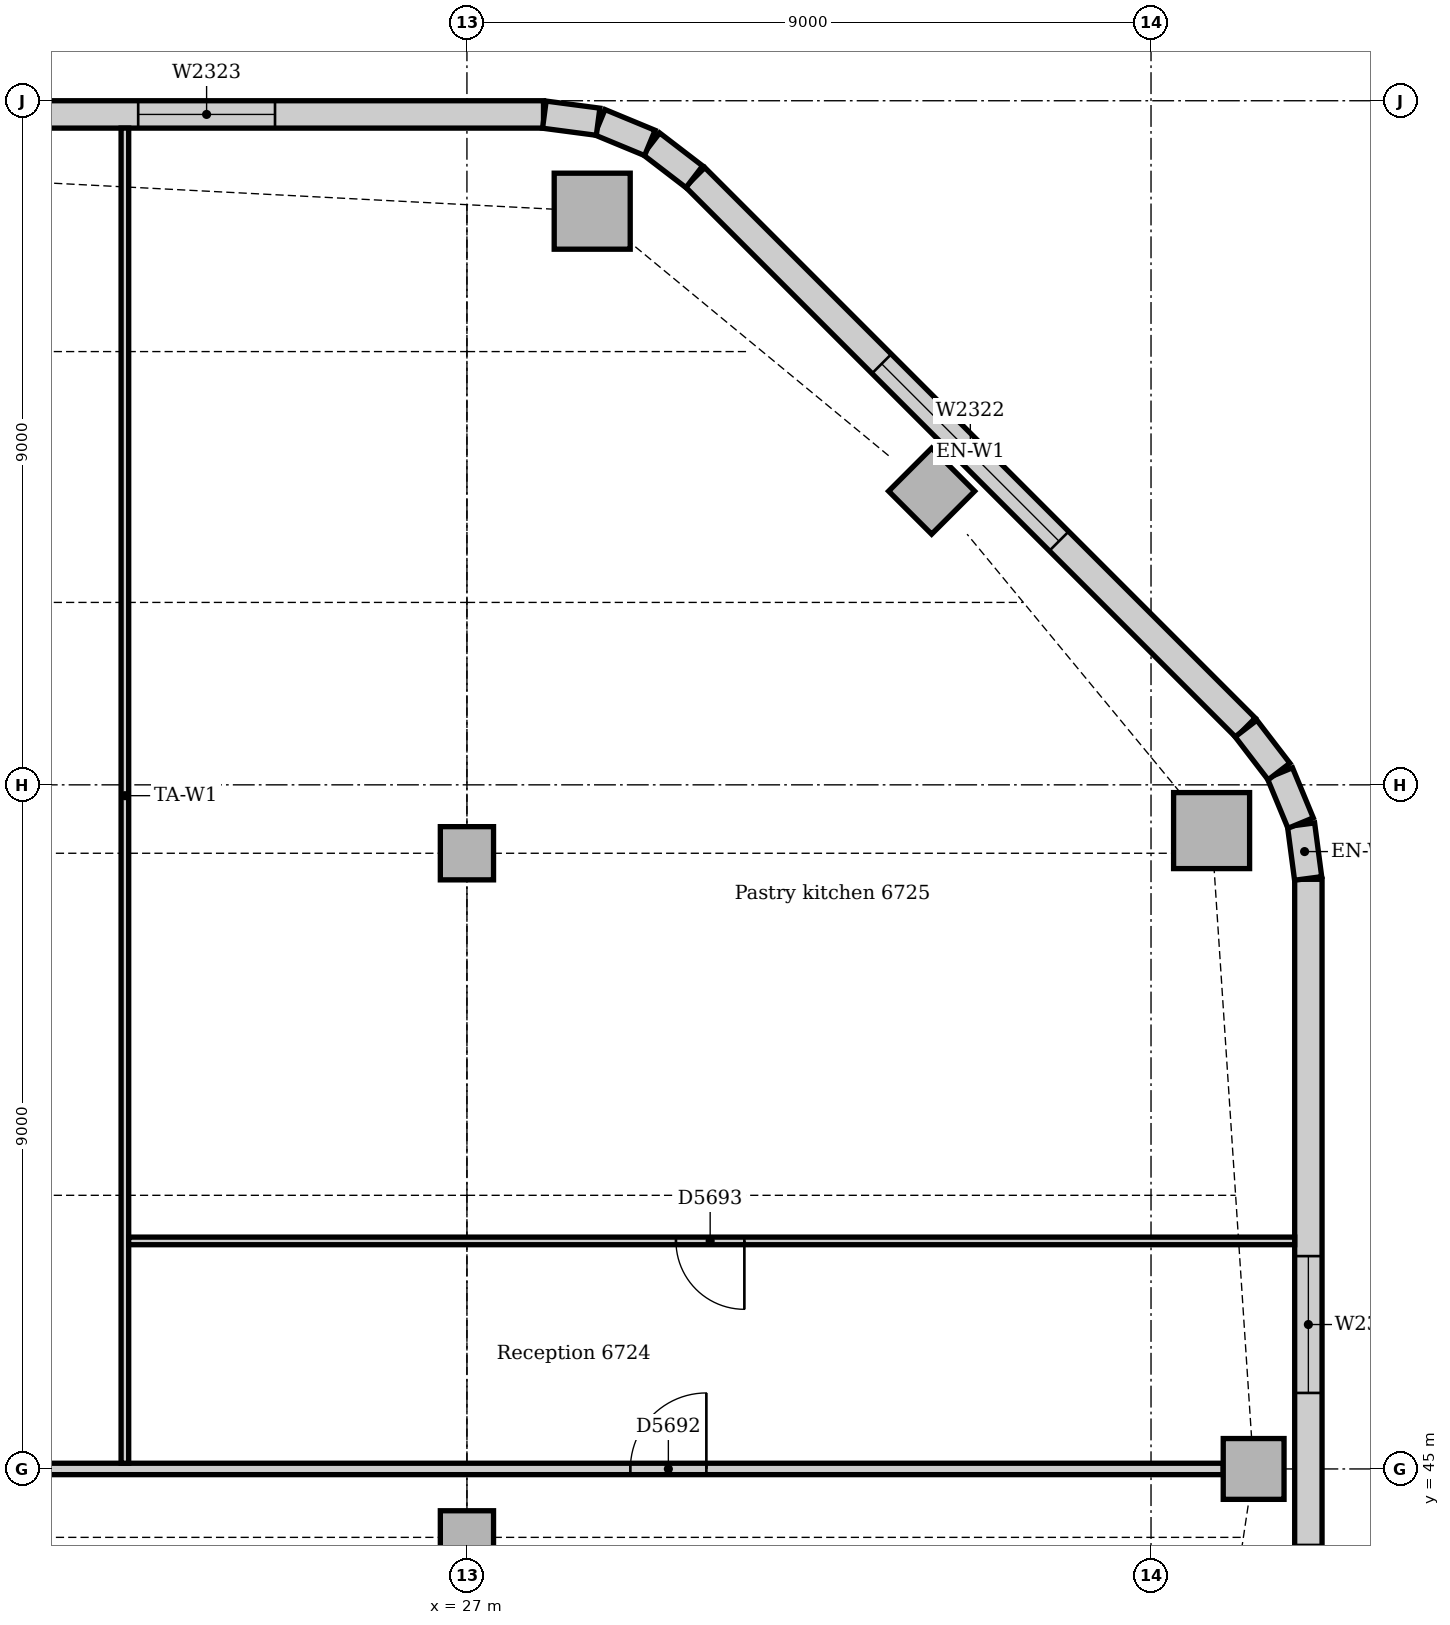
"""IFC4 building model, lengths in metres.
Left out: names, types, materials, properties, quantities, classifications, styles, units other than length and angle.
Written with IfcOpenShell. Run it as: python <this file> out.ifc"""

import sys

from ifc_helpers import new_model, si_unit, direction, frame, frame_2d, origin, origin_2d, place, context, subcontext, project, spatial, rectangle, extrude, element, fill, save


model = new_model("IFC4")
c1 = context("Model", 3, precision=1e-05, world=origin(), true_north=direction((0.0, 1.0)))
c2 = subcontext(c1, "Body", "Model", "MODEL_VIEW")
j1 = project(units=[si_unit("LENGTHUNIT", "METRE"), si_unit("PLANEANGLEUNIT", "RADIAN")], contexts=[c1])
p1 = place(None, origin())
s1 = spatial("IfcSite", under=j1, at=p1, CompositionType="ELEMENT")
p2 = place(p1, origin())
s2 = spatial("IfcBuilding", under=s1, at=p2, CompositionType="ELEMENT")
p3 = place(p2, frame((0.0, 0.0, 279.0)))
s3 = spatial("IfcBuildingStorey", under=s2, at=p3, CompositionType="ELEMENT", Elevation=279.0)
for number, where, z_axis, x_axis in (
    (1, (36.797, 53.398, 0.0), (0.0, 0.0, 1.0), (1.0, 0.0, 0.0)),
    (2, (28.648, 61.547, 0.0), (0.0, 0.0, 1.0), (1.0, 0.0, 0.0)),
):
    element("IfcColumn", number, at=place(p3, frame(where, z_axis=z_axis, x_axis=x_axis)), inside=s3, PredefinedType="COLUMN", context=c2, shape_type="SweptSolid", body=[
        extrude(rectangle(XDim=1.0, YDim=1.0, at=origin_2d()), origin(), (0.0, 0.0, 1.0), 3.8),
    ])
for number, where, z_axis, x_axis in (
    (3, (37.35, 45.0, 0.0), (0.0, 0.0, 1.0), (1.0, 0.0, 0.0)),
    (4, (33.114, 57.864, 0.0), (0.0, 0.0, 1.0), (0.707, 0.707, 0.0)),
):
    element("IfcColumn", number, at=place(p3, frame(where, z_axis=z_axis, x_axis=x_axis)), inside=s3, PredefinedType="COLUMN", context=c2, shape_type="SweptSolid", body=[
        extrude(rectangle(XDim=0.8, YDim=0.8, at=origin_2d()), origin(), (0.0, 0.0, 1.0), 3.8),
    ])
for number, where, z_axis, x_axis in (
    (5, (27.0, 44.1, 0.0), (0.0, 0.0, 1.0), (1.0, 0.0, 0.0)),
    (6, (27.0, 53.1, 0.0), (0.0, 0.0, 1.0), (1.0, 0.0, 0.0)),
):
    element("IfcColumn", number, at=place(p3, frame(where, z_axis=z_axis, x_axis=x_axis)), inside=s3, PredefinedType="COLUMN", context=c2, shape_type="SweptSolid", body=[
        extrude(rectangle(XDim=0.7, YDim=0.7, at=origin_2d()), origin(), (0.0, 0.0, 1.0), 3.8),
    ])
p4 = place(p3, frame((38.07, 28.243, 0.0), z_axis=(0.0, 0.0, 1.0), x_axis=(0.0, 1.0, 0.0)))
e7 = element("IfcWall", 7, at=p4, inside=s3, PredefinedType="STANDARD", context=c2, shape_type="SweptSolid", body=[
    extrude(rectangle(XDim=24.515, YDim=0.36, at=frame_2d((12.257, 0.0))), origin(), (0.0, 0.0, 1.0), 3.8),
])
p5 = place(p4, frame((3.857, 0.0, 0.9)))
e8 = element("IfcOpeningElement", 8, at=p5, cuts=e7, PredefinedType="OPENING", context=c2, shape_type="SweptSolid", body=[
    extrude(rectangle(XDim=3.3, YDim=1.6, at=frame_2d((1.65, 0.8))), frame((0.0, 0.19, 0.0), z_axis=(0.0, -1.0, 0.0), x_axis=(1.0, 0.0, 0.0)), (0.0, 0.0, 1.0), 0.38),
])
p6 = place(p4, frame((8.357, 0.0, 0.9)))
e9 = element("IfcOpeningElement", 9, at=p6, cuts=e7, PredefinedType="OPENING", context=c2, shape_type="SweptSolid", body=[
    extrude(rectangle(XDim=3.3, YDim=1.6, at=frame_2d((1.65, 0.8))), frame((0.0, 0.19, 0.0), z_axis=(0.0, -1.0, 0.0), x_axis=(1.0, 0.0, 0.0)), (0.0, 0.0, 1.0), 0.38),
])
p7 = place(p4, frame((13.957, 0.0, 0.9)))
e10 = element("IfcOpeningElement", 10, at=p7, cuts=e7, PredefinedType="OPENING", context=c2, shape_type="SweptSolid", body=[
    extrude(rectangle(XDim=1.8, YDim=1.6, at=frame_2d((0.9, 0.8))), frame((0.0, 0.19, 0.0), z_axis=(0.0, -1.0, 0.0), x_axis=(1.0, 0.0, 0.0)), (0.0, 0.0, 1.0), 0.38),
])
p8 = place(p4, frame((17.757, 0.0, 0.9)))
e11 = element("IfcOpeningElement", 11, at=p8, cuts=e7, PredefinedType="OPENING", context=c2, shape_type="SweptSolid", body=[
    extrude(rectangle(XDim=1.8, YDim=1.6, at=frame_2d((0.9, 0.8))), frame((0.0, 0.19, 0.0), z_axis=(0.0, -1.0, 0.0), x_axis=(1.0, 0.0, 0.0)), (0.0, 0.0, 1.0), 0.38),
])
p9 = place(p3, frame((37.244, 54.751, 0.0), z_axis=(0.0, 0.0, 1.0), x_axis=(-0.707106781187, 0.707106781187, 0.0)))
e12 = element("IfcWall", 12, at=p9, inside=s3, PredefinedType="STANDARD", context=c2, shape_type="SweptSolid", body=[
    extrude(rectangle(XDim=10.243, YDim=0.36, at=frame_2d((5.121, 0.0))), origin(), (0.0, 0.0, 1.0), 3.8),
])
p10 = place(p9, frame((3.471, 0.0, 0.9)))
e13 = element("IfcOpeningElement", 13, at=p10, cuts=e12, PredefinedType="OPENING", context=c2, shape_type="SweptSolid", body=[
    extrude(rectangle(XDim=3.3, YDim=1.6, at=frame_2d((1.65, 0.8))), frame((0.0, 0.19, 0.0), z_axis=(0.0, -1.0, 0.0), x_axis=(1.0, 0.0, 0.0)), (0.0, 0.0, 1.0), 0.38),
])
p11 = place(p3, frame((28.007, 62.82, 0.0), z_axis=(0.0, 0.0, 1.0), x_axis=(-1.0, 0.0, 0.0)))
e14 = element("IfcWall", 14, at=p11, inside=s3, PredefinedType="STANDARD", context=c2, shape_type="SweptSolid", body=[
    extrude(rectangle(XDim=23.765, YDim=0.36, at=frame_2d((11.882, 0.0))), origin(), (0.0, 0.0, 1.0), 3.8),
])
p12 = place(p11, frame((3.532, 0.0, 0.9)))
e15 = element("IfcOpeningElement", 15, at=p12, cuts=e14, PredefinedType="OPENING", context=c2, shape_type="SweptSolid", body=[
    extrude(rectangle(XDim=1.8, YDim=1.6, at=frame_2d((0.9, 0.8))), frame((0.0, 0.19, 0.0), z_axis=(0.0, -1.0, 0.0), x_axis=(1.0, 0.0, 0.0)), (0.0, 0.0, 1.0), 0.38),
])
p13 = place(p11, frame((7.982, 0.0, 0.9)))
e16 = element("IfcOpeningElement", 16, at=p13, cuts=e14, PredefinedType="OPENING", context=c2, shape_type="SweptSolid", body=[
    extrude(rectangle(XDim=3.3, YDim=1.6, at=frame_2d((1.65, 0.8))), frame((0.0, 0.19, 0.0), z_axis=(0.0, -1.0, 0.0), x_axis=(1.0, 0.0, 0.0)), (0.0, 0.0, 1.0), 0.38),
])
p14 = place(p11, frame((12.482, 0.0, 0.9)))
e17 = element("IfcOpeningElement", 17, at=p14, cuts=e14, PredefinedType="OPENING", context=c2, shape_type="SweptSolid", body=[
    extrude(rectangle(XDim=3.3, YDim=1.6, at=frame_2d((1.65, 0.8))), frame((0.0, 0.19, 0.0), z_axis=(0.0, -1.0, 0.0), x_axis=(1.0, 0.0, 0.0)), (0.0, 0.0, 1.0), 0.38),
])
p15 = place(p11, frame((16.982, 0.0, 0.9)))
e18 = element("IfcOpeningElement", 18, at=p15, cuts=e14, PredefinedType="OPENING", context=c2, shape_type="SweptSolid", body=[
    extrude(rectangle(XDim=3.3, YDim=1.6, at=frame_2d((1.65, 0.8))), frame((0.0, 0.19, 0.0), z_axis=(0.0, -1.0, 0.0), x_axis=(1.0, 0.0, 0.0)), (0.0, 0.0, 1.0), 0.38),
])
for number, where, z_axis, x_axis in (
    (19, (38.067, 52.769, 0.0), (0.0, 0.0, 1.0), (-0.131, 0.991, 0.0)),
    (20, (37.968, 53.497, 0.0), (0.0, 0.0, 1.0), (-0.383, 0.924, 0.0)),
):
    element("IfcWall", number, at=place(p3, frame(where, z_axis=z_axis, x_axis=x_axis)), inside=s3, PredefinedType="STANDARD", context=c2, shape_type="SweptSolid", body=[
        extrude(rectangle(XDim=0.713, YDim=0.36, at=frame_2d((0.356, 0.0))), origin(), (0.0, 0.0, 1.0), 3.8),
    ])
for number, where, z_axis, x_axis in (
    (21, (37.684, 54.175, 0.0), (0.0, 0.0, 1.0), (-0.609, 0.793, 0.0)),
    (22, (29.991, 62.0, 0.0), (0.0, 0.0, 1.0), (-0.793, 0.609, 0.0)),
):
    element("IfcWall", number, at=place(p3, frame(where, z_axis=z_axis, x_axis=x_axis)), inside=s3, PredefinedType="STANDARD", context=c2, shape_type="SweptSolid", body=[
        extrude(rectangle(XDim=0.713, YDim=0.36, at=frame_2d((0.357, 0.0))), origin(), (0.0, 0.0, 1.0), 3.8),
    ])
for number, where, z_axis, x_axis in (
    (23, (29.406, 62.445, 0.0), (0.0, 0.0, 1.0), (-0.924, 0.383, 0.0)),
    (24, (28.726, 62.724, 0.0), (0.0, 0.0, 1.0), (-0.991, 0.131, 0.0)),
):
    element("IfcWall", number, at=place(p3, frame(where, z_axis=z_axis, x_axis=x_axis)), inside=s3, PredefinedType="STANDARD", context=c2, shape_type="SweptSolid", body=[
        extrude(rectangle(XDim=0.713, YDim=0.36, at=frame_2d((0.356, 0.0))), origin(), (0.0, 0.0, 1.0), 3.8),
    ])
p16 = place(p3, frame((0.36, 45.0, 0.0), z_axis=(0.0, 0.0, 1.0), x_axis=(1.0, 0.0, 0.0)))
e25 = element("IfcWall", 25, at=p16, inside=s3, PredefinedType="PARTITIONING", context=c2, shape_type="SweptSolid", body=[
    extrude(rectangle(XDim=36.59, YDim=0.15, at=frame_2d((18.295, 0.0))), origin(), (0.0, 0.0, 1.0), 3.8),
])
p17 = place(p16, frame((3.9, 0.0, 0.0)))
e26 = element("IfcOpeningElement", 26, at=p17, cuts=e25, PredefinedType="OPENING", context=c2, shape_type="SweptSolid", body=[
    extrude(rectangle(XDim=1.0, YDim=2.1, at=frame_2d((0.5, 1.05))), frame((0.0, 0.085, 0.0), z_axis=(0.0, -1.0, 0.0), x_axis=(1.0, 0.0, 0.0)), (0.0, 0.0, 1.0), 0.17),
])
p18 = place(p16, frame((14.94, 0.0, 0.0)))
e27 = element("IfcOpeningElement", 27, at=p18, cuts=e25, PredefinedType="OPENING", context=c2, shape_type="SweptSolid", body=[
    extrude(rectangle(XDim=0.9, YDim=2.1, at=frame_2d((0.45, 1.05))), frame((0.0, 0.085, 0.0), z_axis=(0.0, -1.0, 0.0), x_axis=(1.0, 0.0, 0.0)), (0.0, 0.0, 1.0), 0.17),
])
p19 = place(p16, frame((28.79, 0.0, 0.0)))
e28 = element("IfcOpeningElement", 28, at=p19, cuts=e25, PredefinedType="OPENING", context=c2, shape_type="SweptSolid", body=[
    extrude(rectangle(XDim=1.0, YDim=2.1, at=frame_2d((0.5, 1.05))), frame((0.0, 0.085, 0.0), z_axis=(0.0, -1.0, 0.0), x_axis=(1.0, 0.0, 0.0)), (0.0, 0.0, 1.0), 0.17),
])
p20 = place(p3, frame((22.5, 45.075, 0.0), z_axis=(0.0, 0.0, 1.0), x_axis=(0.0, 1.0, 0.0)))
e29 = element("IfcWall", 29, at=p20, inside=s3, PredefinedType="PARTITIONING", context=c2, shape_type="SweptSolid", body=[
    extrude(rectangle(XDim=17.565, YDim=0.1, at=frame_2d((8.783, 0.0))), origin(), (0.0, 0.0, 1.0), 3.8),
])
p21 = place(p3, frame((22.55, 48.0, 0.0), z_axis=(0.0, 0.0, 1.0), x_axis=(1.0, 0.0, 0.0)))
e30 = element("IfcWall", 30, at=p21, inside=s3, PredefinedType="PARTITIONING", context=c2, shape_type="SweptSolid", body=[
    extrude(rectangle(XDim=15.34, YDim=0.1, at=frame_2d((7.67, 0.0))), origin(), (0.0, 0.0, 1.0), 3.8),
])
p22 = place(p21, frame((7.2, 0.0, 0.0)))
e31 = element("IfcOpeningElement", 31, at=p22, cuts=e30, PredefinedType="OPENING", context=c2, shape_type="SweptSolid", body=[
    extrude(rectangle(XDim=0.9, YDim=2.1, at=frame_2d((0.45, 1.05))), frame((0.0, 0.06, 0.0), z_axis=(0.0, -1.0, 0.0), x_axis=(1.0, 0.0, 0.0)), (0.0, 0.0, 1.0), 0.12),
])
p23 = place(p8, origin())
e32 = element("IfcWindow", 32, at=p23, inside=s3, PartitioningType="SINGLE_PANEL", PredefinedType="WINDOW", context=c2, shape_type="SweptSolid", body=[
    extrude(rectangle(XDim=1.8, YDim=1.6, at=frame_2d((0.9, 0.8))), frame((0.0, 0.13, 0.0), z_axis=(0.0, -1.0, 0.0), x_axis=(1.0, 0.0, 0.0)), (0.0, 0.0, 1.0), 0.06),
])
fill(e11, e32)
p24 = place(p10, origin())
e33 = element("IfcWindow", 33, at=p24, inside=s3, PartitioningType="SINGLE_PANEL", PredefinedType="WINDOW", context=c2, shape_type="SweptSolid", body=[
    extrude(rectangle(XDim=3.3, YDim=1.6, at=frame_2d((1.65, 0.8))), frame((0.0, 0.13, 0.0), z_axis=(0.0, -1.0, 0.0), x_axis=(1.0, 0.0, 0.0)), (0.0, 0.0, 1.0), 0.06),
])
fill(e13, e33)
p25 = place(p12, origin())
e34 = element("IfcWindow", 34, at=p25, inside=s3, PartitioningType="SINGLE_PANEL", PredefinedType="WINDOW", context=c2, shape_type="SweptSolid", body=[
    extrude(rectangle(XDim=1.8, YDim=1.6, at=frame_2d((0.9, 0.8))), frame((0.0, 0.13, 0.0), z_axis=(0.0, -1.0, 0.0), x_axis=(1.0, 0.0, 0.0)), (0.0, 0.0, 1.0), 0.06),
])
fill(e15, e34)
p26 = place(p19, origin())
e35 = element("IfcDoor", 35, at=p26, inside=s3, OperationType="SINGLE_SWING_RIGHT", PredefinedType="DOOR", context=c2, shape_type="SweptSolid", body=[
    extrude(rectangle(XDim=1.0, YDim=2.1, at=frame_2d((0.5, 1.05))), frame((0.0, 0.025, 0.0), z_axis=(0.0, -1.0, 0.0), x_axis=(1.0, 0.0, 0.0)), (0.0, 0.0, 1.0), 0.05),
])
fill(e28, e35)
p27 = place(p22, frame((0.9, 0.0, 0.0), z_axis=(0.0, 0.0, 1.0), x_axis=(-1.0, 0.0, 0.0)))
e36 = element("IfcDoor", 36, at=p27, inside=s3, OperationType="SINGLE_SWING_LEFT", PredefinedType="DOOR", context=c2, shape_type="SweptSolid", body=[
    extrude(rectangle(XDim=0.9, YDim=2.1, at=frame_2d((0.45, 1.05))), frame((0.0, 0.025, 0.0), z_axis=(0.0, -1.0, 0.0), x_axis=(1.0, 0.0, 0.0)), (0.0, 0.0, 1.0), 0.05),
])
fill(e31, e36)
save(model, sys.argv[1])
